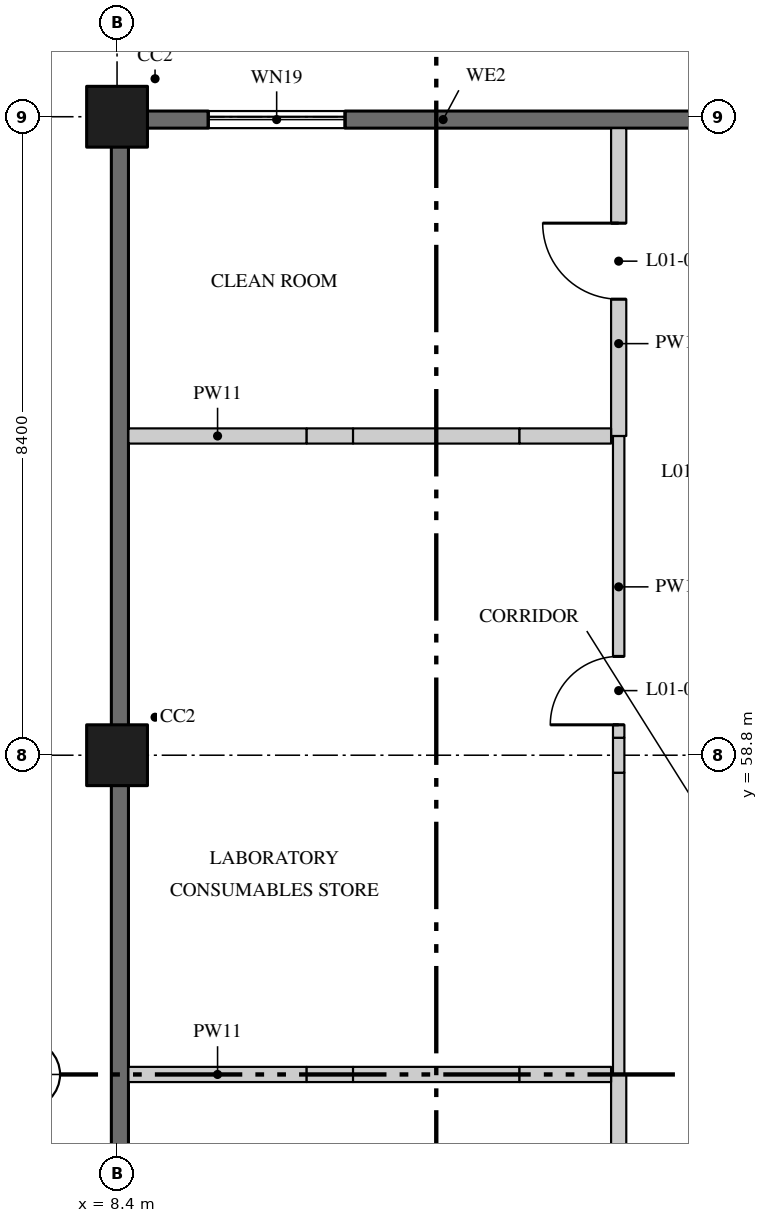
"""IFC4 building model, lengths in metres.
Left out: names, types, materials, properties, quantities, classifications, styles, units other than length and angle.
Written with IfcOpenShell. Run it as: python <this file> out.ifc"""

import sys

from ifc_helpers import new_model, si_unit, direction, frame, frame_2d, origin, origin_2d, place, context, subcontext, project, spatial, rectangle, extrude, element, fill, save


model = new_model("IFC4")
c1 = context("Model", 3, precision=1e-05, world=origin(), true_north=direction((0.0, 1.0)))
c2 = subcontext(c1, "Body", "Model", "MODEL_VIEW")
j1 = project(units=[si_unit("LENGTHUNIT", "METRE"), si_unit("PLANEANGLEUNIT", "RADIAN")], contexts=[c1])
p1 = place(None, origin())
s1 = spatial("IfcSite", under=j1, at=p1, CompositionType="ELEMENT")
p2 = place(p1, origin())
s2 = spatial("IfcBuilding", under=s1, at=p2, CompositionType="ELEMENT")
p3 = place(p2, frame((0.0, 0.0, 5.4)))
s3 = spatial("IfcBuildingStorey", under=s2, at=p3, CompositionType="ELEMENT", Elevation=5.4)
for number, where, z_axis, x_axis in (
    (1, (8.4, 58.8, 0.0), (0.0, 0.0, 1.0), (1.0, 0.0, 0.0)),
    (2, (8.4, 67.2, 0.0), (0.0, 0.0, 1.0), (1.0, 0.0, 0.0)),
):
    element("IfcColumn", number, at=place(p3, frame(where, z_axis=z_axis, x_axis=x_axis)), inside=s3, PredefinedType="COLUMN", context=c2, shape_type="SweptSolid", body=[
        extrude(rectangle(XDim=0.8, YDim=0.8, at=origin_2d()), origin(), (0.0, 0.0, 1.0), 4.37),
    ])
p4 = place(p3, frame((15.0, 50.705, 0.0), z_axis=(0.0, 0.0, 1.0), x_axis=(0.0, 1.0, 0.0)))
e3 = element("IfcWall", 3, at=p4, inside=s3, PredefinedType="PARTITIONING", context=c2, shape_type="SweptSolid", body=[
    extrude(rectangle(XDim=3.895, YDim=0.2, at=frame_2d((1.948, 0.0))), origin(), (0.0, 0.0, 1.0), 4.37),
])
p5 = place(p3, frame((15.0, 54.6, 0.0), z_axis=(0.0, 0.0, 1.0), x_axis=(0.0, 1.0, 0.0)))
e4 = element("IfcWall", 4, at=p5, inside=s3, PredefinedType="PARTITIONING", context=c2, shape_type="SweptSolid", body=[
    extrude(rectangle(XDim=3.97, YDim=0.15, at=frame_2d((1.985, 0.0))), origin(), (0.0, 0.0, 1.0), 4.37),
])
p6 = place(p3, frame((15.0, 58.57, 0.0), z_axis=(0.0, 0.0, 1.0), x_axis=(0.0, 1.0, 0.0)))
e5 = element("IfcWall", 5, at=p6, inside=s3, PredefinedType="PARTITIONING", context=c2, shape_type="SweptSolid", body=[
    extrude(rectangle(XDim=0.46, YDim=0.15, at=frame_2d((0.23, 0.0))), origin(), (0.0, 0.0, 1.0), 3.746),
])
p7 = place(p3, frame((15.0, 59.03, 0.0), z_axis=(0.0, 0.0, 1.0), x_axis=(0.0, 1.0, 0.0)))
e6 = element("IfcWall", 6, at=p7, inside=s3, PredefinedType="PARTITIONING", context=c2, shape_type="SweptSolid", body=[
    extrude(rectangle(XDim=3.97, YDim=0.15, at=frame_2d((1.985, 0.0))), origin(), (0.0, 0.0, 1.0), 4.37),
])
p8 = place(p7, frame((0.17, 0.0, 0.0)))
e7 = element("IfcOpeningElement", 7, at=p8, cuts=e6, PredefinedType="OPENING", context=c2, shape_type="SweptSolid", body=[
    extrude(rectangle(XDim=0.9, YDim=2.1, at=frame_2d((0.45, 1.05))), frame((0.0, 0.085, 0.0), z_axis=(0.0, -1.0, 0.0), x_axis=(1.0, 0.0, 0.0)), (0.0, 0.0, 1.0), 0.17),
])
p9 = place(p3, frame((15.0, 63.0, 0.0), z_axis=(0.0, 0.0, 1.0), x_axis=(0.0, 1.0, 0.0)))
e8 = element("IfcWall", 8, at=p9, inside=s3, PredefinedType="PARTITIONING", context=c2, shape_type="SweptSolid", body=[
    extrude(rectangle(XDim=4.05, YDim=0.2, at=frame_2d((2.025, 0.0))), origin(), (0.0, 0.0, 1.0), 4.37),
])
p10 = place(p9, frame((1.8, 0.0, 0.0)))
e9 = element("IfcOpeningElement", 9, at=p10, cuts=e8, PredefinedType="OPENING", context=c2, shape_type="SweptSolid", body=[
    extrude(rectangle(XDim=1.0, YDim=2.1, at=frame_2d((0.5, 1.05))), frame((0.0, 0.11, 0.0), z_axis=(0.0, -1.0, 0.0), x_axis=(1.0, 0.0, 0.0)), (0.0, 0.0, 1.0), 0.22),
])
p11 = place(p3, frame((8.55, 54.6, 0.0), z_axis=(0.0, 0.0, 1.0), x_axis=(1.0, 0.0, 0.0)))
e10 = element("IfcWall", 10, at=p11, inside=s3, PredefinedType="PARTITIONING", context=c2, shape_type="SweptSolid", body=[
    extrude(rectangle(XDim=2.345, YDim=0.2, at=frame_2d((1.172, 0.0))), origin(), (0.0, 0.0, 1.0), 4.37),
])
p12 = place(p3, frame((10.895, 54.6, 0.0), z_axis=(0.0, 0.0, 1.0), x_axis=(1.0, 0.0, 0.0)))
e11 = element("IfcWall", 11, at=p12, inside=s3, PredefinedType="PARTITIONING", context=c2, shape_type="SweptSolid", body=[
    extrude(rectangle(XDim=0.61, YDim=0.2, at=frame_2d((0.305, 0.0))), origin(), (0.0, 0.0, 1.0), 3.895),
])
p13 = place(p3, frame((11.505, 54.6, 0.0), z_axis=(0.0, 0.0, 1.0), x_axis=(1.0, 0.0, 0.0)))
e12 = element("IfcWall", 12, at=p13, inside=s3, PredefinedType="PARTITIONING", context=c2, shape_type="SweptSolid", body=[
    extrude(rectangle(XDim=2.19, YDim=0.2, at=frame_2d((1.095, 0.0))), origin(), (0.0, 0.0, 1.0), 4.37),
])
p14 = place(p3, frame((13.695, 54.6, 0.0), z_axis=(0.0, 0.0, 1.0), x_axis=(1.0, 0.0, 0.0)))
e13 = element("IfcWall", 13, at=p14, inside=s3, PredefinedType="PARTITIONING", context=c2, shape_type="SweptSolid", body=[
    extrude(rectangle(XDim=1.205, YDim=0.2, at=frame_2d((0.603, 0.0))), origin(), (0.0, 0.0, 1.0), 3.895),
])
p15 = place(p3, frame((8.55, 63.0, 0.0), z_axis=(0.0, 0.0, 1.0), x_axis=(1.0, 0.0, 0.0)))
e14 = element("IfcWall", 14, at=p15, inside=s3, PredefinedType="PARTITIONING", context=c2, shape_type="SweptSolid", body=[
    extrude(rectangle(XDim=2.345, YDim=0.2, at=frame_2d((1.172, 0.0))), origin(), (0.0, 0.0, 1.0), 4.37),
])
p16 = place(p3, frame((10.895, 63.0, 0.0), z_axis=(0.0, 0.0, 1.0), x_axis=(1.0, 0.0, 0.0)))
e15 = element("IfcWall", 15, at=p16, inside=s3, PredefinedType="PARTITIONING", context=c2, shape_type="SweptSolid", body=[
    extrude(rectangle(XDim=0.61, YDim=0.2, at=frame_2d((0.305, 0.0))), origin(), (0.0, 0.0, 1.0), 3.895),
])
p17 = place(p3, frame((11.505, 63.0, 0.0), z_axis=(0.0, 0.0, 1.0), x_axis=(1.0, 0.0, 0.0)))
e16 = element("IfcWall", 16, at=p17, inside=s3, PredefinedType="PARTITIONING", context=c2, shape_type="SweptSolid", body=[
    extrude(rectangle(XDim=2.19, YDim=0.2, at=frame_2d((1.095, 0.0))), origin(), (0.0, 0.0, 1.0), 4.37),
])
p18 = place(p3, frame((13.695, 63.0, 0.0), z_axis=(0.0, 0.0, 1.0), x_axis=(1.0, 0.0, 0.0)))
e17 = element("IfcWall", 17, at=p18, inside=s3, PredefinedType="PARTITIONING", context=c2, shape_type="SweptSolid", body=[
    extrude(rectangle(XDim=1.205, YDim=0.2, at=frame_2d((0.603, 0.0))), origin(), (0.0, 0.0, 1.0), 3.895),
])
p19 = place(p3, frame((8.438, 66.82, 0.0), z_axis=(0.0, 0.0, 1.0), x_axis=(0.0, -1.0, 0.0)))
e18 = element("IfcWall", 18, at=p19, inside=s3, PredefinedType="SOLIDWALL", context=c2, shape_type="SweptSolid", body=[
    extrude(rectangle(XDim=7.64, YDim=0.225, at=frame_2d((3.82, 0.0))), origin(), (0.0, 0.0, 1.0), 3.746),
])
p20 = place(p3, frame((8.438, 58.42, 0.0), z_axis=(0.0, 0.0, 1.0), x_axis=(0.0, -1.0, 0.0)))
e19 = element("IfcWall", 19, at=p20, inside=s3, PredefinedType="SOLIDWALL", context=c2, shape_type="SweptSolid", body=[
    extrude(rectangle(XDim=7.64, YDim=0.225, at=frame_2d((3.82, 0.0))), origin(), (0.0, 0.0, 1.0), 3.746),
])
p21 = place(p3, frame((16.6, 67.163, 0.0), z_axis=(0.0, 0.0, 1.0), x_axis=(-1.0, 0.0, 0.0)))
e20 = element("IfcWall", 20, at=p21, inside=s3, PredefinedType="SOLIDWALL", context=c2, shape_type="SweptSolid", body=[
    extrude(rectangle(XDim=7.82, YDim=0.225, at=frame_2d((3.91, 0.0))), origin(), (0.0, 0.0, 1.0), 3.746),
])
p22 = place(p21, frame((5.2, 0.0, 1.5)))
e21 = element("IfcOpeningElement", 21, at=p22, cuts=e20, PredefinedType="OPENING", context=c2, shape_type="SweptSolid", body=[
    extrude(rectangle(XDim=1.8, YDim=0.6, at=frame_2d((0.9, 0.3))), frame((0.0, 0.123, 0.0), z_axis=(0.0, -1.0, 0.0), x_axis=(1.0, 0.0, 0.0)), (0.0, 0.0, 1.0), 0.245),
])
p23 = place(p8, origin())
e22 = element("IfcDoor", 22, at=p23, inside=s3, OperationType="SINGLE_SWING_RIGHT", PredefinedType="DOOR", context=c2, shape_type="SweptSolid", body=[
    extrude(rectangle(XDim=0.9, YDim=2.1, at=frame_2d((0.45, 1.05))), frame((0.0, 0.025, 0.0), z_axis=(0.0, -1.0, 0.0), x_axis=(1.0, 0.0, 0.0)), (0.0, 0.0, 1.0), 0.05),
])
fill(e7, e22)
p24 = place(p10, origin())
e23 = element("IfcDoor", 23, at=p24, inside=s3, OperationType="SINGLE_SWING_LEFT", PredefinedType="DOOR", context=c2, shape_type="SweptSolid", body=[
    extrude(rectangle(XDim=1.0, YDim=2.1, at=frame_2d((0.5, 1.05))), frame((0.0, 0.025, 0.0), z_axis=(0.0, -1.0, 0.0), x_axis=(1.0, 0.0, 0.0)), (0.0, 0.0, 1.0), 0.05),
])
fill(e9, e23)
p25 = place(p22, origin())
e24 = element("IfcWindow", 24, at=p25, inside=s3, PartitioningType="SINGLE_PANEL", PredefinedType="WINDOW", context=c2, shape_type="SweptSolid", body=[
    extrude(rectangle(XDim=1.8, YDim=0.6, at=frame_2d((0.9, 0.3))), frame((0.0, 0.03, 0.0), z_axis=(0.0, -1.0, 0.0), x_axis=(1.0, 0.0, 0.0)), (0.0, 0.0, 1.0), 0.06),
])
fill(e21, e24)
save(model, sys.argv[1])
